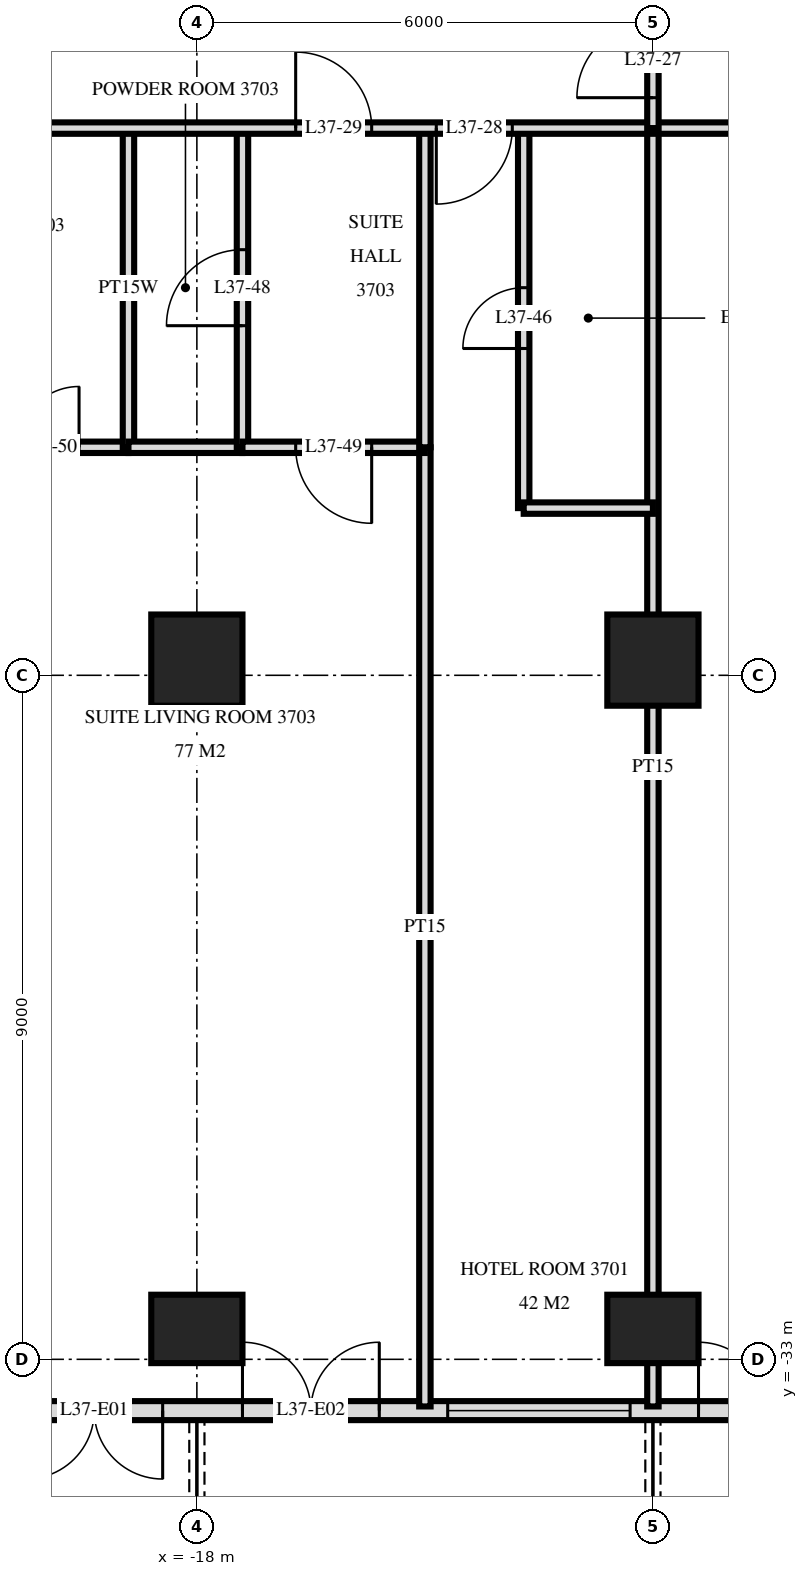
"""IFC4 building model, lengths in metres.
Left out: names, types, materials, properties, quantities, classifications, styles, units other than length and angle.
Written with IfcOpenShell. Run it as: python <this file> out.ifc"""

import sys

from ifc_helpers import new_model, si_unit, direction, frame, frame_2d, origin, origin_2d, place, context, subcontext, project, spatial, rectangle, extrude, element, fill, save


model = new_model("IFC4")
c1 = context("Model", 3, precision=1e-05, world=origin(), true_north=direction((0.0, 1.0)))
c2 = subcontext(c1, "Body", "Model", "MODEL_VIEW")
j1 = project(units=[si_unit("LENGTHUNIT", "METRE"), si_unit("PLANEANGLEUNIT", "RADIAN")], contexts=[c1])
p1 = place(None, origin())
s1 = spatial("IfcSite", under=j1, at=p1, CompositionType="ELEMENT")
p2 = place(p1, origin())
s2 = spatial("IfcBuilding", under=s1, at=p2, CompositionType="ELEMENT")
p3 = place(p2, frame((0.0, 0.0, 145.2)))
s3 = spatial("IfcBuildingStorey", under=s2, at=p3, CompositionType="ELEMENT", Elevation=145.2)
p4 = place(p3, frame((-18.0, -32.6, 0.0), z_axis=(0.0, 0.0, 1.0), x_axis=(1.0, 0.0, 0.0)))
e1 = element("IfcColumn", 1, at=p4, inside=s3, PredefinedType="COLUMN", context=c2, shape_type="SweptSolid", body=[
    extrude(rectangle(XDim=1.2, YDim=0.9, at=origin_2d()), origin(), (0.0, 0.0, 1.0), 3.6),
])
p5 = place(p3, frame((-18.0, -23.8, 0.0), z_axis=(0.0, 0.0, 1.0), x_axis=(1.0, 0.0, 0.0)))
e2 = element("IfcColumn", 2, at=p5, inside=s3, PredefinedType="COLUMN", context=c2, shape_type="SweptSolid", body=[
    extrude(rectangle(XDim=1.2, YDim=1.2, at=origin_2d()), origin(), (0.0, 0.0, 1.0), 3.6),
])
p6 = place(p3, frame((-12.0, -32.6, 0.0), z_axis=(0.0, 0.0, 1.0), x_axis=(1.0, 0.0, 0.0)))
e3 = element("IfcColumn", 3, at=p6, inside=s3, PredefinedType="COLUMN", context=c2, shape_type="SweptSolid", body=[
    extrude(rectangle(XDim=1.2, YDim=0.9, at=origin_2d()), origin(), (0.0, 0.0, 1.0), 3.6),
])
p7 = place(p3, frame((-12.0, -23.8, 0.0), z_axis=(0.0, 0.0, 1.0), x_axis=(1.0, 0.0, 0.0)))
e4 = element("IfcColumn", 4, at=p7, inside=s3, PredefinedType="COLUMN", context=c2, shape_type="SweptSolid", body=[
    extrude(rectangle(XDim=1.2, YDim=1.2, at=origin_2d()), origin(), (0.0, 0.0, 1.0), 3.6),
])
p8 = place(p3, frame((-23.675, -33.675, 0.0), z_axis=(0.0, 0.0, 1.0), x_axis=(1.0, 0.0, 0.0)))
e5 = element("IfcWall", 5, at=p8, inside=s3, PredefinedType="SOLIDWALL", context=c2, shape_type="SweptSolid", body=[
    extrude(rectangle(XDim=47.351, YDim=0.25, at=frame_2d((23.675, 0.0))), origin(), (0.0, 0.0, 1.0), 3.32),
])
p9 = place(p8, frame((3.425, 0.0, 0.0)))
e6 = element("IfcOpeningElement", 6, at=p9, cuts=e5, PredefinedType="OPENING", context=c2, shape_type="SweptSolid", body=[
    extrude(rectangle(XDim=1.8, YDim=2.4, at=frame_2d((0.9, 1.2))), frame((0.0, 0.135, 0.0), z_axis=(0.0, -1.0, 0.0), x_axis=(1.0, 0.0, 0.0)), (0.0, 0.0, 1.0), 0.27),
])
p10 = place(p8, frame((6.275, 0.0, 0.0)))
e7 = element("IfcOpeningElement", 7, at=p10, cuts=e5, PredefinedType="OPENING", context=c2, shape_type="SweptSolid", body=[
    extrude(rectangle(XDim=1.8, YDim=2.4, at=frame_2d((0.9, 1.2))), frame((0.0, 0.135, 0.0), z_axis=(0.0, -1.0, 0.0), x_axis=(1.0, 0.0, 0.0)), (0.0, 0.0, 1.0), 0.27),
])
p11 = place(p8, frame((8.975, 0.0, 0.3)))
e8 = element("IfcOpeningElement", 8, at=p11, cuts=e5, PredefinedType="OPENING", context=c2, shape_type="SweptSolid", body=[
    extrude(rectangle(XDim=2.4, YDim=2.1, at=frame_2d((1.2, 1.05))), frame((0.0, 0.135, 0.0), z_axis=(0.0, -1.0, 0.0), x_axis=(1.0, 0.0, 0.0)), (0.0, 0.0, 1.0), 0.27),
])
p12 = place(p8, frame((12.275, 0.0, 0.0)))
e9 = element("IfcOpeningElement", 9, at=p12, cuts=e5, PredefinedType="OPENING", context=c2, shape_type="SweptSolid", body=[
    extrude(rectangle(XDim=1.8, YDim=2.4, at=frame_2d((0.9, 1.2))), frame((0.0, 0.135, 0.0), z_axis=(0.0, -1.0, 0.0), x_axis=(1.0, 0.0, 0.0)), (0.0, 0.0, 1.0), 0.27),
])
p13 = place(p8, frame((14.975, 0.0, 0.3)))
e10 = element("IfcOpeningElement", 10, at=p13, cuts=e5, PredefinedType="OPENING", context=c2, shape_type="SweptSolid", body=[
    extrude(rectangle(XDim=2.4, YDim=2.1, at=frame_2d((1.2, 1.05))), frame((0.0, 0.135, 0.0), z_axis=(0.0, -1.0, 0.0), x_axis=(1.0, 0.0, 0.0)), (0.0, 0.0, 1.0), 0.27),
])
p14 = place(p8, frame((21.275, 0.0, 0.0)))
e11 = element("IfcOpeningElement", 11, at=p14, cuts=e5, PredefinedType="OPENING", context=c2, shape_type="SweptSolid", body=[
    extrude(rectangle(XDim=1.8, YDim=2.4, at=frame_2d((0.9, 1.2))), frame((0.0, 0.135, 0.0), z_axis=(0.0, -1.0, 0.0), x_axis=(1.0, 0.0, 0.0)), (0.0, 0.0, 1.0), 0.27),
])
p15 = place(p8, frame((24.275, 0.0, 0.0)))
e12 = element("IfcOpeningElement", 12, at=p15, cuts=e5, PredefinedType="OPENING", context=c2, shape_type="SweptSolid", body=[
    extrude(rectangle(XDim=1.8, YDim=2.4, at=frame_2d((0.9, 1.2))), frame((0.0, 0.135, 0.0), z_axis=(0.0, -1.0, 0.0), x_axis=(1.0, 0.0, 0.0)), (0.0, 0.0, 1.0), 0.27),
])
p16 = place(p8, frame((30.275, 0.0, 0.0)))
e13 = element("IfcOpeningElement", 13, at=p16, cuts=e5, PredefinedType="OPENING", context=c2, shape_type="SweptSolid", body=[
    extrude(rectangle(XDim=1.8, YDim=2.4, at=frame_2d((0.9, 1.2))), frame((0.0, 0.135, 0.0), z_axis=(0.0, -1.0, 0.0), x_axis=(1.0, 0.0, 0.0)), (0.0, 0.0, 1.0), 0.27),
])
p17 = place(p8, frame((32.975, 0.0, 0.3)))
e14 = element("IfcOpeningElement", 14, at=p17, cuts=e5, PredefinedType="OPENING", context=c2, shape_type="SweptSolid", body=[
    extrude(rectangle(XDim=2.4, YDim=2.1, at=frame_2d((1.2, 1.05))), frame((0.0, 0.135, 0.0), z_axis=(0.0, -1.0, 0.0), x_axis=(1.0, 0.0, 0.0)), (0.0, 0.0, 1.0), 0.27),
])
p18 = place(p8, frame((36.275, 0.0, 0.0)))
e15 = element("IfcOpeningElement", 15, at=p18, cuts=e5, PredefinedType="OPENING", context=c2, shape_type="SweptSolid", body=[
    extrude(rectangle(XDim=1.8, YDim=2.4, at=frame_2d((0.9, 1.2))), frame((0.0, 0.135, 0.0), z_axis=(0.0, -1.0, 0.0), x_axis=(1.0, 0.0, 0.0)), (0.0, 0.0, 1.0), 0.27),
])
p19 = place(p8, frame((38.975, 0.0, 0.3)))
e16 = element("IfcOpeningElement", 16, at=p19, cuts=e5, PredefinedType="OPENING", context=c2, shape_type="SweptSolid", body=[
    extrude(rectangle(XDim=2.4, YDim=2.1, at=frame_2d((1.2, 1.05))), frame((0.0, 0.135, 0.0), z_axis=(0.0, -1.0, 0.0), x_axis=(1.0, 0.0, 0.0)), (0.0, 0.0, 1.0), 0.27),
])
p20 = place(p8, frame((42.275, 0.0, 0.0)))
e17 = element("IfcOpeningElement", 17, at=p20, cuts=e5, PredefinedType="OPENING", context=c2, shape_type="SweptSolid", body=[
    extrude(rectangle(XDim=1.8, YDim=2.4, at=frame_2d((0.9, 1.2))), frame((0.0, 0.135, 0.0), z_axis=(0.0, -1.0, 0.0), x_axis=(1.0, 0.0, 0.0)), (0.0, 0.0, 1.0), 0.27),
])
p21 = place(p8, frame((45.125, 0.0, 0.3)))
e18 = element("IfcOpeningElement", 18, at=p21, cuts=e5, PredefinedType="OPENING", context=c2, shape_type="SweptSolid", body=[
    extrude(rectangle(XDim=1.8, YDim=2.1, at=frame_2d((0.9, 1.05))), frame((0.0, 0.135, 0.0), z_axis=(0.0, -1.0, 0.0), x_axis=(1.0, 0.0, 0.0)), (0.0, 0.0, 1.0), 0.27),
])
p22 = place(p3, frame((-12.0, -16.8, 0.0), z_axis=(0.0, 0.0, 1.0), x_axis=(0.0, 1.0, 0.0)))
e19 = element("IfcWall", 19, at=p22, inside=s3, PredefinedType="PARTITIONING", context=c2, shape_type="SweptSolid", body=[
    extrude(rectangle(XDim=1.75, YDim=0.15, at=frame_2d((0.875, 0.0))), origin(), (0.0, 0.0, 1.0), 3.32),
])
p23 = place(p22, frame((0.4, 0.0, 0.0)))
e20 = element("IfcOpeningElement", 20, at=p23, cuts=e19, PredefinedType="OPENING", context=c2, shape_type="SweptSolid", body=[
    extrude(rectangle(XDim=1.0, YDim=2.1, at=frame_2d((0.5, 1.05))), frame((0.0, 0.085, 0.0), z_axis=(0.0, -1.0, 0.0), x_axis=(1.0, 0.0, 0.0)), (0.0, 0.0, 1.0), 0.17),
])
p24 = place(p3, frame((-12.0, -33.62, 0.0), z_axis=(0.0, 0.0, 1.0), x_axis=(0.0, 1.0, 0.0)))
e21 = element("IfcWall", 21, at=p24, inside=s3, PredefinedType="PARTITIONING", context=c2, shape_type="SweptSolid", body=[
    extrude(rectangle(XDim=16.82, YDim=0.15, at=frame_2d((8.41, 0.0))), origin(), (0.0, 0.0, 1.0), 3.32),
])
p25 = place(p3, frame((-13.7, -21.8, 0.0), z_axis=(0.0, 0.0, 1.0), x_axis=(0.0, 1.0, 0.0)))
e22 = element("IfcWall", 22, at=p25, inside=s3, PredefinedType="PARTITIONING", context=c2, shape_type="SweptSolid", body=[
    extrude(rectangle(XDim=5.0, YDim=0.15, at=frame_2d((2.5, 0.0))), origin(), (0.0, 0.0, 1.0), 3.32),
])
p26 = place(p25, frame((2.1, 0.0, 0.0)))
e23 = element("IfcOpeningElement", 23, at=p26, cuts=e22, PredefinedType="OPENING", context=c2, shape_type="SweptSolid", body=[
    extrude(rectangle(XDim=0.8, YDim=2.1, at=frame_2d((0.4, 1.05))), frame((0.0, 0.085, 0.0), z_axis=(0.0, -1.0, 0.0), x_axis=(1.0, 0.0, 0.0)), (0.0, 0.0, 1.0), 0.17),
])
p27 = place(p3, frame((-15.0, -21.0, 0.0), z_axis=(0.0, 0.0, 1.0), x_axis=(0.0, 1.0, 0.0)))
e24 = element("IfcWall", 24, at=p27, inside=s3, PredefinedType="PARTITIONING", context=c2, shape_type="SweptSolid", body=[
    extrude(rectangle(XDim=4.2, YDim=0.15, at=frame_2d((2.1, 0.0))), origin(), (0.0, 0.0, 1.0), 3.32),
])
p28 = place(p3, frame((-15.0, -33.62, 0.0), z_axis=(0.0, 0.0, 1.0), x_axis=(0.0, 1.0, 0.0)))
e25 = element("IfcWall", 25, at=p28, inside=s3, PredefinedType="PARTITIONING", context=c2, shape_type="SweptSolid", body=[
    extrude(rectangle(XDim=12.62, YDim=0.15, at=frame_2d((6.31, 0.0))), origin(), (0.0, 0.0, 1.0), 3.32),
])
p29 = place(p3, frame((-17.4, -21.0, 0.0), z_axis=(0.0, 0.0, 1.0), x_axis=(0.0, 1.0, 0.0)))
e26 = element("IfcWall", 26, at=p29, inside=s3, PredefinedType="PARTITIONING", context=c2, shape_type="SweptSolid", body=[
    extrude(rectangle(XDim=4.2, YDim=0.15, at=frame_2d((2.1, 0.0))), origin(), (0.0, 0.0, 1.0), 3.32),
])
p30 = place(p29, frame((1.6, 0.0, 0.0)))
e27 = element("IfcOpeningElement", 27, at=p30, cuts=e26, PredefinedType="OPENING", context=c2, shape_type="SweptSolid", body=[
    extrude(rectangle(XDim=1.0, YDim=2.1, at=frame_2d((0.5, 1.05))), frame((0.0, 0.085, 0.0), z_axis=(0.0, -1.0, 0.0), x_axis=(1.0, 0.0, 0.0)), (0.0, 0.0, 1.0), 0.17),
])
p31 = place(p3, frame((-18.9, -21.0, 0.0), z_axis=(0.0, 0.0, 1.0), x_axis=(0.0, 1.0, 0.0)))
e28 = element("IfcWall", 28, at=p31, inside=s3, PredefinedType="PLUMBINGWALL", context=c2, shape_type="SweptSolid", body=[
    extrude(rectangle(XDim=4.2, YDim=0.15, at=frame_2d((2.1, 0.0))), origin(), (0.0, 0.0, 1.0), 3.32),
])
p32 = place(p3, frame((-13.7, -21.8, 0.0), z_axis=(0.0, 0.0, 1.0), x_axis=(1.0, 0.0, 0.0)))
e29 = element("IfcWall", 29, at=p32, inside=s3, PredefinedType="PARTITIONING", context=c2, shape_type="SweptSolid", body=[
    extrude(rectangle(XDim=1.7, YDim=0.15, at=frame_2d((0.85, 0.0))), origin(), (0.0, 0.0, 1.0), 3.32),
])
p33 = place(p3, frame((-17.4, -21.0, 0.0), z_axis=(0.0, 0.0, 1.0), x_axis=(1.0, 0.0, 0.0)))
e30 = element("IfcWall", 30, at=p33, inside=s3, PredefinedType="PARTITIONING", context=c2, shape_type="SweptSolid", body=[
    extrude(rectangle(XDim=2.4, YDim=0.15, at=frame_2d((1.2, 0.0))), origin(), (0.0, 0.0, 1.0), 3.32),
])
p34 = place(p33, frame((0.7, 0.0, 0.0)))
e31 = element("IfcOpeningElement", 31, at=p34, cuts=e30, PredefinedType="OPENING", context=c2, shape_type="SweptSolid", body=[
    extrude(rectangle(XDim=1.0, YDim=2.1, at=frame_2d((0.5, 1.05))), frame((0.0, 0.085, 0.0), z_axis=(0.0, -1.0, 0.0), x_axis=(1.0, 0.0, 0.0)), (0.0, 0.0, 1.0), 0.17),
])
p35 = place(p3, frame((-28.02, -21.0, 0.0), z_axis=(0.0, 0.0, 1.0), x_axis=(1.0, 0.0, 0.0)))
e32 = element("IfcWall", 32, at=p35, inside=s3, PredefinedType="PARTITIONING", context=c2, shape_type="SweptSolid", body=[
    extrude(rectangle(XDim=9.12, YDim=0.15, at=frame_2d((4.56, 0.0))), origin(), (0.0, 0.0, 1.0), 3.32),
])
p36 = place(p35, frame((7.67, 0.0, 0.0)))
e33 = element("IfcOpeningElement", 33, at=p36, cuts=e32, PredefinedType="OPENING", context=c2, shape_type="SweptSolid", body=[
    extrude(rectangle(XDim=0.8, YDim=2.1, at=frame_2d((0.4, 1.05))), frame((0.0, 0.085, 0.0), z_axis=(0.0, -1.0, 0.0), x_axis=(1.0, 0.0, 0.0)), (0.0, 0.0, 1.0), 0.17),
])
p37 = place(p35, frame((2.52, 0.0, 0.0)))
e34 = element("IfcOpeningElement", 34, at=p37, cuts=e32, PredefinedType="OPENING", context=c2, shape_type="SweptSolid", body=[
    extrude(rectangle(XDim=0.9, YDim=2.1, at=frame_2d((0.45, 1.05))), frame((0.0, 0.085, 0.0), z_axis=(0.0, -1.0, 0.0), x_axis=(1.0, 0.0, 0.0)), (0.0, 0.0, 1.0), 0.17),
])
p38 = place(p3, frame((-18.9, -21.0, 0.0), z_axis=(0.0, 0.0, 1.0), x_axis=(1.0, 0.0, 0.0)))
e35 = element("IfcWall", 35, at=p38, inside=s3, PredefinedType="PLUMBINGWALL", context=c2, shape_type="SweptSolid", body=[
    extrude(rectangle(XDim=1.5, YDim=0.15, at=frame_2d((0.75, 0.0))), origin(), (0.0, 0.0, 1.0), 3.32),
])
p39 = place(p3, frame((-28.02, -16.8, 0.0), z_axis=(0.0, 0.0, 1.0), x_axis=(1.0, 0.0, 0.0)))
e36 = element("IfcWall", 36, at=p39, inside=s3, PredefinedType="PARTITIONING", context=c2, shape_type="SweptSolid", body=[
    extrude(rectangle(XDim=56.04, YDim=0.15, at=frame_2d((28.02, 0.0))), origin(), (0.0, 0.0, 1.0), 3.32),
])
p40 = place(p39, frame((13.17, 0.0, 0.0)))
e37 = element("IfcOpeningElement", 37, at=p40, cuts=e36, PredefinedType="OPENING", context=c2, shape_type="SweptSolid", body=[
    extrude(rectangle(XDim=1.0, YDim=2.1, at=frame_2d((0.5, 1.05))), frame((0.0, 0.085, 0.0), z_axis=(0.0, -1.0, 0.0), x_axis=(1.0, 0.0, 0.0)), (0.0, 0.0, 1.0), 0.17),
])
p41 = place(p39, frame((11.32, 0.0, 0.0)))
e38 = element("IfcOpeningElement", 38, at=p41, cuts=e36, PredefinedType="OPENING", context=c2, shape_type="SweptSolid", body=[
    extrude(rectangle(XDim=1.0, YDim=2.1, at=frame_2d((0.5, 1.05))), frame((0.0, 0.085, 0.0), z_axis=(0.0, -1.0, 0.0), x_axis=(1.0, 0.0, 0.0)), (0.0, 0.0, 1.0), 0.17),
])
p42 = place(p39, frame((41.87, 0.0, 0.0)))
e39 = element("IfcOpeningElement", 39, at=p42, cuts=e36, PredefinedType="OPENING", context=c2, shape_type="SweptSolid", body=[
    extrude(rectangle(XDim=1.0, YDim=2.1, at=frame_2d((0.5, 1.05))), frame((0.0, 0.085, 0.0), z_axis=(0.0, -1.0, 0.0), x_axis=(1.0, 0.0, 0.0)), (0.0, 0.0, 1.0), 0.17),
])
p43 = place(p39, frame((43.72, 0.0, 0.0)))
e40 = element("IfcOpeningElement", 40, at=p43, cuts=e36, PredefinedType="OPENING", context=c2, shape_type="SweptSolid", body=[
    extrude(rectangle(XDim=1.0, YDim=2.1, at=frame_2d((0.5, 1.05))), frame((0.0, 0.085, 0.0), z_axis=(0.0, -1.0, 0.0), x_axis=(1.0, 0.0, 0.0)), (0.0, 0.0, 1.0), 0.17),
])
p44 = place(p39, frame((19.52, 0.0, 0.0)))
e41 = element("IfcOpeningElement", 41, at=p44, cuts=e36, PredefinedType="OPENING", context=c2, shape_type="SweptSolid", body=[
    extrude(rectangle(XDim=1.0, YDim=2.1, at=frame_2d((0.5, 1.05))), frame((0.0, 0.085, 0.0), z_axis=(0.0, -1.0, 0.0), x_axis=(1.0, 0.0, 0.0)), (0.0, 0.0, 1.0), 0.17),
])
p45 = place(p39, frame((27.52, 0.0, 0.0)))
e42 = element("IfcOpeningElement", 42, at=p45, cuts=e36, PredefinedType="OPENING", context=c2, shape_type="SweptSolid", body=[
    extrude(rectangle(XDim=1.0, YDim=2.1, at=frame_2d((0.5, 1.05))), frame((0.0, 0.085, 0.0), z_axis=(0.0, -1.0, 0.0), x_axis=(1.0, 0.0, 0.0)), (0.0, 0.0, 1.0), 0.17),
])
p46 = place(p39, frame((35.52, 0.0, 0.0)))
e43 = element("IfcOpeningElement", 43, at=p46, cuts=e36, PredefinedType="OPENING", context=c2, shape_type="SweptSolid", body=[
    extrude(rectangle(XDim=1.0, YDim=2.1, at=frame_2d((0.5, 1.05))), frame((0.0, 0.085, 0.0), z_axis=(0.0, -1.0, 0.0), x_axis=(1.0, 0.0, 0.0)), (0.0, 0.0, 1.0), 0.17),
])
p47 = place(p9, frame((0.9, 0.0, 0.0), z_axis=(0.0, 0.0, 1.0), x_axis=(-1.0, 0.0, 0.0)))
e44 = element("IfcDoor", 44, at=p47, inside=s3, OperationType="DOUBLE_DOOR_SINGLE_SWING", PredefinedType="DOOR", context=c2, shape_type="SweptSolid", body=[
    extrude(rectangle(XDim=1.8, YDim=2.4, at=frame_2d((0.0, 1.2))), frame((0.0, -0.025, 0.0), z_axis=(0.0, 1.0, 0.0), x_axis=(-1.0, 0.0, 0.0)), (0.0, 0.0, 1.0), 0.05),
])
fill(e6, e44)
p48 = place(p10, origin())
e45 = element("IfcDoor", 45, at=p48, inside=s3, OperationType="DOUBLE_DOOR_SINGLE_SWING", PredefinedType="DOOR", context=c2, shape_type="SweptSolid", body=[
    extrude(rectangle(XDim=1.8, YDim=2.4, at=frame_2d((0.9, 1.2))), frame((0.0, 0.025, 0.0), z_axis=(0.0, -1.0, 0.0), x_axis=(1.0, 0.0, 0.0)), (0.0, 0.0, 1.0), 0.05),
])
fill(e7, e45)
p49 = place(p11, origin())
e46 = element("IfcWindow", 46, at=p49, inside=s3, PartitioningType="SINGLE_PANEL", PredefinedType="WINDOW", context=c2, shape_type="SweptSolid", body=[
    extrude(rectangle(XDim=2.4, YDim=2.1, at=frame_2d((1.2, 1.05))), frame((0.0, 0.03, 0.0), z_axis=(0.0, -1.0, 0.0), x_axis=(1.0, 0.0, 0.0)), (0.0, 0.0, 1.0), 0.06),
])
fill(e8, e46)
p50 = place(p12, origin())
e47 = element("IfcDoor", 47, at=p50, inside=s3, OperationType="DOUBLE_DOOR_SINGLE_SWING", PredefinedType="DOOR", context=c2, shape_type="SweptSolid", body=[
    extrude(rectangle(XDim=1.8, YDim=2.4, at=frame_2d((0.9, 1.2))), frame((0.0, 0.025, 0.0), z_axis=(0.0, -1.0, 0.0), x_axis=(1.0, 0.0, 0.0)), (0.0, 0.0, 1.0), 0.05),
])
fill(e9, e47)
p51 = place(p23, origin())
e48 = element("IfcDoor", 48, at=p51, inside=s3, OperationType="SINGLE_SWING_RIGHT", PredefinedType="DOOR", context=c2, shape_type="SweptSolid", body=[
    extrude(rectangle(XDim=1.0, YDim=2.1, at=frame_2d((0.5, 1.05))), frame((0.0, 0.025, 0.0), z_axis=(0.0, -1.0, 0.0), x_axis=(1.0, 0.0, 0.0)), (0.0, 0.0, 1.0), 0.05),
])
fill(e20, e48)
p52 = place(p40, frame((0.5, 0.0, 0.0), z_axis=(0.0, 0.0, 1.0), x_axis=(-1.0, 0.0, 0.0)))
e49 = element("IfcDoor", 49, at=p52, inside=s3, OperationType="SINGLE_SWING_LEFT", PredefinedType="DOOR", context=c2, shape_type="SweptSolid", body=[
    extrude(rectangle(XDim=1.0, YDim=2.1, at=frame_2d((0.0, 1.05))), frame((0.0, -0.025, 0.0), z_axis=(0.0, 1.0, 0.0), x_axis=(-1.0, 0.0, 0.0)), (0.0, 0.0, 1.0), 0.05),
])
fill(e37, e49)
p53 = place(p41, origin())
e50 = element("IfcDoor", 50, at=p53, inside=s3, OperationType="SINGLE_SWING_RIGHT", PredefinedType="DOOR", context=c2, shape_type="SweptSolid", body=[
    extrude(rectangle(XDim=1.0, YDim=2.1, at=frame_2d((0.5, 1.05))), frame((0.0, 0.025, 0.0), z_axis=(0.0, -1.0, 0.0), x_axis=(1.0, 0.0, 0.0)), (0.0, 0.0, 1.0), 0.05),
])
fill(e38, e50)
p54 = place(p26, origin())
e51 = element("IfcDoor", 51, at=p54, inside=s3, OperationType="SINGLE_SWING_RIGHT", PredefinedType="DOOR", context=c2, shape_type="SweptSolid", body=[
    extrude(rectangle(XDim=0.8, YDim=2.1, at=frame_2d((0.4, 1.05))), frame((0.0, 0.025, 0.0), z_axis=(0.0, -1.0, 0.0), x_axis=(1.0, 0.0, 0.0)), (0.0, 0.0, 1.0), 0.05),
])
fill(e23, e51)
p55 = place(p30, origin())
e52 = element("IfcDoor", 52, at=p55, inside=s3, OperationType="SINGLE_SWING_RIGHT", PredefinedType="DOOR", context=c2, shape_type="SweptSolid", body=[
    extrude(rectangle(XDim=1.0, YDim=2.1, at=frame_2d((0.5, 1.05))), frame((0.0, 0.025, 0.0), z_axis=(0.0, -1.0, 0.0), x_axis=(1.0, 0.0, 0.0)), (0.0, 0.0, 1.0), 0.05),
])
fill(e27, e52)
p56 = place(p34, frame((0.5, 0.0, 0.0), z_axis=(0.0, 0.0, 1.0), x_axis=(-1.0, 0.0, 0.0)))
e53 = element("IfcDoor", 53, at=p56, inside=s3, OperationType="SINGLE_SWING_RIGHT", PredefinedType="DOOR", context=c2, shape_type="SweptSolid", body=[
    extrude(rectangle(XDim=1.0, YDim=2.1, at=frame_2d((0.0, 1.05))), frame((0.0, -0.025, 0.0), z_axis=(0.0, 1.0, 0.0), x_axis=(-1.0, 0.0, 0.0)), (0.0, 0.0, 1.0), 0.05),
])
fill(e31, e53)
p57 = place(p36, origin())
e54 = element("IfcDoor", 54, at=p57, inside=s3, OperationType="SINGLE_SWING_LEFT", PredefinedType="DOOR", context=c2, shape_type="SweptSolid", body=[
    extrude(rectangle(XDim=0.8, YDim=2.1, at=frame_2d((0.4, 1.05))), frame((0.0, 0.025, 0.0), z_axis=(0.0, -1.0, 0.0), x_axis=(1.0, 0.0, 0.0)), (0.0, 0.0, 1.0), 0.05),
])
fill(e33, e54)
save(model, sys.argv[1])
